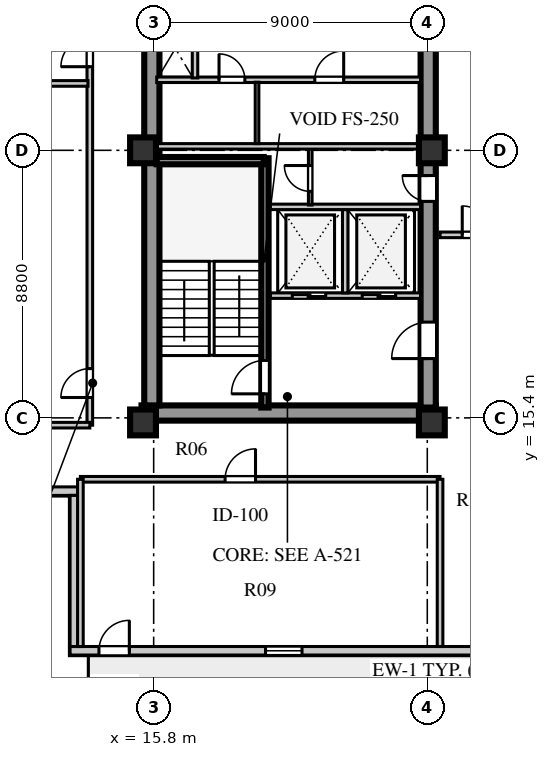
"""IFC4 building model, lengths in metres.
Left out: names, types, materials, properties, quantities, classifications, styles, units other than length and angle.
Written with IfcOpenShell. Run it as: python <this file> out.ifc"""

import sys

from ifc_helpers import new_model, si_unit, direction, frame, frame_2d, origin, origin_2d, place, context, subcontext, project, spatial, rectangle, extrude, element, fill, save


model = new_model("IFC4")
c1 = context("Model", 3, precision=1e-05, world=origin(), true_north=direction((0.0, 1.0)))
c2 = subcontext(c1, "Body", "Model", "MODEL_VIEW")
j1 = project(units=[si_unit("LENGTHUNIT", "METRE"), si_unit("PLANEANGLEUNIT", "RADIAN")], contexts=[c1])
p1 = place(None, origin())
s1 = spatial("IfcSite", under=j1, at=p1, CompositionType="ELEMENT")
p2 = place(p1, origin())
s2 = spatial("IfcBuilding", under=s1, at=p2, CompositionType="ELEMENT")
p3 = place(p2, frame((0.0, 0.0, 157.9)))
s3 = spatial("IfcBuildingStorey", under=s2, at=p3, CompositionType="ELEMENT", Elevation=157.9)
p4 = place(p3, frame((15.4, 15.56, 0.0), z_axis=(0.0, 0.0, 1.0), x_axis=(1.0, 0.0, 0.0)))
e1 = element("IfcWall", 1, at=p4, inside=s3, PredefinedType="SHEAR", context=c2, shape_type="SweptSolid", body=[
    extrude(rectangle(XDim=9.68, YDim=0.5, at=frame_2d((4.84, 0.0))), origin(), (0.0, 0.0, 1.0), 3.6),
])
p5 = place(p3, frame((15.74, 15.81, 0.0), z_axis=(0.0, 0.0, 1.0), x_axis=(0.0, 1.0, 0.0)))
e2 = element("IfcWall", 2, at=p5, inside=s3, PredefinedType="SHEAR", context=c2, shape_type="SweptSolid", body=[
    extrude(rectangle(XDim=25.63, YDim=0.5, at=frame_2d((12.815, 0.0))), origin(), (0.0, 0.0, 1.0), 3.6),
])
p6 = place(p3, frame((24.83, 15.74, 0.0), z_axis=(0.0, 0.0, 1.0), x_axis=(0.0, 1.0, 0.0)))
e3 = element("IfcWall", 3, at=p6, inside=s3, PredefinedType="SHEAR", context=c2, shape_type="SweptSolid", body=[
    extrude(rectangle(XDim=25.76, YDim=0.5, at=frame_2d((12.88, 0.0))), origin(), (0.0, 0.0, 1.0), 3.6),
])
p7 = place(p6, frame((1.61, 0.0, 0.0)))
e4 = element("IfcOpeningElement", 4, at=p7, cuts=e3, PredefinedType="OPENING", context=c2, shape_type="SweptSolid", body=[
    extrude(rectangle(XDim=1.2, YDim=2.1, at=frame_2d((0.6, 1.05))), frame((0.0, 0.26, 0.0), z_axis=(0.0, -1.0, 0.0), x_axis=(1.0, 0.0, 0.0)), (0.0, 0.0, 1.0), 0.52),
])
p8 = place(p6, frame((6.78, 0.0, 0.0)))
e5 = element("IfcOpeningElement", 5, at=p8, cuts=e3, PredefinedType="OPENING", context=c2, shape_type="SweptSolid", body=[
    extrude(rectangle(XDim=0.85, YDim=2.06, at=frame_2d((0.425, 1.03))), frame((0.0, 0.26, 0.0), z_axis=(0.0, -1.0, 0.0), x_axis=(1.0, 0.0, 0.0)), (0.0, 0.0, 1.0), 0.52),
])
p9 = place(p6, frame((12.11, 0.0, 0.0)))
e6 = element("IfcOpeningElement", 6, at=p9, cuts=e3, PredefinedType="OPENING", context=c2, shape_type="SweptSolid", body=[
    extrude(rectangle(XDim=1.5, YDim=2.12, at=frame_2d((0.75, 1.06))), frame((0.0, 0.26, 0.0), z_axis=(0.0, -1.0, 0.0), x_axis=(1.0, 0.0, 0.0)), (0.0, 0.0, 1.0), 0.52),
])
p10 = place(p6, frame((20.11, 0.0, 0.0)))
e7 = element("IfcOpeningElement", 7, at=p10, cuts=e3, PredefinedType="OPENING", context=c2, shape_type="SweptSolid", body=[
    extrude(rectangle(XDim=1.2, YDim=2.12, at=frame_2d((0.6, 1.06))), frame((0.0, 0.26, 0.0), z_axis=(0.0, -1.0, 0.0), x_axis=(1.0, 0.0, 0.0)), (0.0, 0.0, 1.0), 0.52),
])
p11 = place(p6, frame((24.01, 0.0, 0.0)))
e8 = element("IfcOpeningElement", 8, at=p11, cuts=e3, PredefinedType="OPENING", context=c2, shape_type="SweptSolid", body=[
    extrude(rectangle(XDim=0.95, YDim=2.1, at=frame_2d((0.475, 1.05))), frame((0.0, 0.26, 0.0), z_axis=(0.0, -1.0, 0.0), x_axis=(1.0, 0.0, 0.0)), (0.0, 0.0, 1.0), 0.52),
])
for number, where, z_axis, x_axis in (
    (9, (15.45, 15.25, 0.0), (0.0, 0.0, 1.0), (1.0, 0.0, 0.0)),
    (10, (15.45, 24.2, 0.0), (0.0, 0.0, 1.0), (1.0, 0.0, 0.0)),
    (11, (24.95, 15.25, 0.0), (0.0, 0.0, 1.0), (1.0, 0.0, 0.0)),
    (12, (24.95, 24.2, 0.0), (0.0, 0.0, 1.0), (1.0, 0.0, 0.0)),
):
    element("IfcColumn", number, at=place(p3, frame(where, z_axis=z_axis, x_axis=x_axis)), inside=s3, PredefinedType="COLUMN", context=c2, shape_type="SweptSolid", body=[
        extrude(rectangle(XDim=0.85, YDim=0.85, at=origin_2d()), origin(), (0.0, 0.0, 1.0), 3.6),
    ])
p12 = place(p3, frame((13.05, 7.74, 0.0), z_axis=(0.0, 0.0, 1.0), x_axis=(1.0, 0.0, 0.0)))
e13 = element("IfcWall", 13, at=p12, inside=s3, PredefinedType="STANDARD", context=c2, shape_type="SweptSolid", body=[
    extrude(rectangle(XDim=32.5, YDim=0.28, at=frame_2d((16.25, 0.0))), origin(), (0.0, 0.0, 1.0), 3.6),
])
p13 = place(p12, frame((0.95, 0.0, 0.0)))
e14 = element("IfcOpeningElement", 14, at=p13, cuts=e13, PredefinedType="OPENING", context=c2, shape_type="SweptSolid", body=[
    extrude(rectangle(XDim=1.0, YDim=2.05, at=frame_2d((0.5, 1.025))), frame((0.0, 0.15, 0.0), z_axis=(0.0, -1.0, 0.0), x_axis=(1.0, 0.0, 0.0)), (0.0, 0.0, 1.0), 0.3),
])
p14 = place(p12, frame((6.43, 0.0, 0.8)))
e15 = element("IfcOpeningElement", 15, at=p14, cuts=e13, PredefinedType="OPENING", context=c2, shape_type="SweptSolid", body=[
    extrude(rectangle(XDim=1.2, YDim=1.75, at=frame_2d((0.6, 0.875))), frame((0.0, 0.15, 0.0), z_axis=(0.0, -1.0, 0.0), x_axis=(1.0, 0.0, 0.0)), (0.0, 0.0, 1.0), 0.3),
])
p15 = place(p12, frame((17.665, 0.0, 0.8)))
e16 = element("IfcOpeningElement", 16, at=p15, cuts=e13, PredefinedType="OPENING", context=c2, shape_type="SweptSolid", body=[
    extrude(rectangle(XDim=2.4, YDim=2.05, at=frame_2d((1.2, 1.025))), frame((0.0, 0.15, 0.0), z_axis=(0.0, -1.0, 0.0), x_axis=(1.0, 0.0, 0.0)), (0.0, 0.0, 1.0), 0.3),
])
p16 = place(p12, frame((26.065, 0.0, 0.8)))
e17 = element("IfcOpeningElement", 17, at=p16, cuts=e13, PredefinedType="OPENING", context=c2, shape_type="SweptSolid", body=[
    extrude(rectangle(XDim=1.2, YDim=1.75, at=frame_2d((0.6, 0.875))), frame((0.0, 0.15, 0.0), z_axis=(0.0, -1.0, 0.0), x_axis=(1.0, 0.0, 0.0)), (0.0, 0.0, 1.0), 0.3),
])
p17 = place(p12, frame((29.405, 0.0, 0.8)))
e18 = element("IfcOpeningElement", 18, at=p17, cuts=e13, PredefinedType="OPENING", context=c2, shape_type="SweptSolid", body=[
    extrude(rectangle(XDim=1.35, YDim=1.9, at=frame_2d((0.675, 0.95))), frame((0.0, 0.15, 0.0), z_axis=(0.0, -1.0, 0.0), x_axis=(1.0, 0.0, 0.0)), (0.0, 0.0, 1.0), 0.3),
])
p18 = place(p3, frame((7.8, 12.99, 0.0), z_axis=(0.0, 0.0, 1.0), x_axis=(1.0, 0.0, 0.0)))
e19 = element("IfcWall", 19, at=p18, inside=s3, PredefinedType="STANDARD", context=c2, shape_type="SweptSolid", body=[
    extrude(rectangle(XDim=5.53, YDim=0.28, at=frame_2d((2.765, 0.0))), origin(), (0.0, 0.0, 1.0), 3.6),
])
p19 = place(p3, frame((13.19, 12.85, 0.0), z_axis=(0.0, 0.0, 1.0), x_axis=(0.0, -1.0, 0.0)))
e20 = element("IfcWall", 20, at=p19, inside=s3, PredefinedType="STANDARD", context=c2, shape_type="SweptSolid", body=[
    extrude(rectangle(XDim=4.97, YDim=0.28, at=frame_2d((2.485, 0.0))), origin(), (0.0, 0.0, 1.0), 3.6),
])
p20 = place(p3, frame((19.46, 15.74, 0.0), z_axis=(0.0, 0.0, 1.0), x_axis=(0.0, 1.0, 0.0)))
e21 = element("IfcWall", 21, at=p20, inside=s3, PredefinedType="SHEAR", context=c2, shape_type="SweptSolid", body=[
    extrude(rectangle(XDim=8.2, YDim=0.24, at=frame_2d((4.1, 0.0))), origin(), (0.0, 0.0, 1.0), 3.85),
])
p21 = place(p20, frame((0.45, 0.0, 0.0)))
e22 = element("IfcOpeningElement", 22, at=p21, cuts=e21, PredefinedType="OPENING", context=c2, shape_type="SweptSolid", body=[
    extrude(rectangle(XDim=1.1, YDim=2.1, at=frame_2d((0.55, 1.05))), frame((0.0, 0.13, 0.0), z_axis=(0.0, -1.0, 0.0), x_axis=(1.0, 0.0, 0.0)), (0.0, 0.0, 1.0), 0.26),
])
p22 = place(p3, frame((15.9, 23.86, 0.0), z_axis=(0.0, 0.0, 1.0), x_axis=(1.0, 0.0, 0.0)))
e23 = element("IfcWall", 23, at=p22, inside=s3, PredefinedType="SHEAR", context=c2, shape_type="SweptSolid", body=[
    extrude(rectangle(XDim=3.52, YDim=0.24, at=frame_2d((1.76, 0.0))), origin(), (0.0, 0.0, 1.0), 3.85),
])
p23 = place(p3, frame((19.64, 19.42, 0.0), z_axis=(0.0, 0.0, 1.0), x_axis=(1.0, 0.0, 0.0)))
e24 = element("IfcWall", 24, at=p23, inside=s3, PredefinedType="SOLIDWALL", context=c2, shape_type="SweptSolid", body=[
    extrude(rectangle(XDim=4.94, YDim=0.18, at=frame_2d((2.47, 0.0))), origin(), (0.0, 0.0, 1.0), 3.6),
])
p24 = place(p23, frame((0.72, 0.0, 0.0)))
e25 = element("IfcOpeningElement", 25, at=p24, cuts=e24, PredefinedType="OPENING", context=c2, shape_type="SweptSolid", body=[
    extrude(rectangle(XDim=1.1, YDim=2.1, at=frame_2d((0.55, 1.05))), frame((0.0, 0.1, 0.0), z_axis=(0.0, -1.0, 0.0), x_axis=(1.0, 0.0, 0.0)), (0.0, 0.0, 1.0), 0.2),
])
p25 = place(p23, frame((3.02, 0.0, 0.0)))
e26 = element("IfcOpeningElement", 26, at=p25, cuts=e24, PredefinedType="OPENING", context=c2, shape_type="SweptSolid", body=[
    extrude(rectangle(XDim=1.1, YDim=2.1, at=frame_2d((0.55, 1.05))), frame((0.0, 0.1, 0.0), z_axis=(0.0, -1.0, 0.0), x_axis=(1.0, 0.0, 0.0)), (0.0, 0.0, 1.0), 0.2),
])
p26 = place(p3, frame((22.1, 19.51, 0.0), z_axis=(0.0, 0.0, 1.0), x_axis=(0.0, 1.0, 0.0)))
e27 = element("IfcWall", 27, at=p26, inside=s3, PredefinedType="SOLIDWALL", context=c2, shape_type="SweptSolid", body=[
    extrude(rectangle(XDim=2.74, YDim=0.18, at=frame_2d((1.37, 0.0))), origin(), (0.0, 0.0, 1.0), 3.6),
])
p27 = place(p3, frame((19.64, 22.34, 0.0), z_axis=(0.0, 0.0, 1.0), x_axis=(1.0, 0.0, 0.0)))
e28 = element("IfcWall", 28, at=p27, inside=s3, PredefinedType="SOLIDWALL", context=c2, shape_type="SweptSolid", body=[
    extrude(rectangle(XDim=4.94, YDim=0.18, at=frame_2d((2.47, 0.0))), origin(), (0.0, 0.0, 1.0), 3.6),
])
p28 = place(p3, frame((20.95, 22.4, 0.0), z_axis=(0.0, 0.0, 1.0), x_axis=(0.0, 1.0, 0.0)))
e29 = element("IfcWall", 29, at=p28, inside=s3, PredefinedType="PARTITIONING", context=c2, shape_type="SweptSolid", body=[
    extrude(rectangle(XDim=1.88, YDim=0.12, at=frame_2d((0.94, 0.0))), origin(), (0.0, 0.0, 1.0), 3.6),
])
p29 = place(p28, frame((0.45, 0.0, 0.0)))
e30 = element("IfcOpeningElement", 30, at=p29, cuts=e29, PredefinedType="OPENING", context=c2, shape_type="SweptSolid", body=[
    extrude(rectangle(XDim=0.85, YDim=2.06, at=frame_2d((0.425, 1.03))), frame((0.0, 0.07, 0.0), z_axis=(0.0, -1.0, 0.0), x_axis=(1.0, 0.0, 0.0)), (0.0, 0.0, 1.0), 0.14),
])
p30 = place(p3, frame((15.9, 26.52, 0.0), z_axis=(0.0, 0.0, 1.0), x_axis=(1.0, 0.0, 0.0)))
e31 = element("IfcWall", 31, at=p30, inside=s3, PredefinedType="SOLIDWALL", context=c2, shape_type="SweptSolid", body=[
    extrude(rectangle(XDim=8.68, YDim=0.18, at=frame_2d((4.34, 0.0))), origin(), (0.0, 0.0, 1.0), 3.6),
])
p31 = place(p30, frame((2.05, 0.0, 0.0)))
e32 = element("IfcOpeningElement", 32, at=p31, cuts=e31, PredefinedType="OPENING", context=c2, shape_type="SweptSolid", body=[
    extrude(rectangle(XDim=0.85, YDim=2.06, at=frame_2d((0.425, 1.03))), frame((0.0, 0.1, 0.0), z_axis=(0.0, -1.0, 0.0), x_axis=(1.0, 0.0, 0.0)), (0.0, 0.0, 1.0), 0.2),
])
p32 = place(p30, frame((5.2, 0.0, 0.0)))
e33 = element("IfcOpeningElement", 33, at=p32, cuts=e31, PredefinedType="OPENING", context=c2, shape_type="SweptSolid", body=[
    extrude(rectangle(XDim=0.95, YDim=2.1, at=frame_2d((0.475, 1.05))), frame((0.0, 0.1, 0.0), z_axis=(0.0, -1.0, 0.0), x_axis=(1.0, 0.0, 0.0)), (0.0, 0.0, 1.0), 0.2),
])
p33 = place(p3, frame((15.9, 24.33, 0.0), z_axis=(0.0, 0.0, 1.0), x_axis=(1.0, 0.0, 0.0)))
e34 = element("IfcWall", 34, at=p33, inside=s3, PredefinedType="SOLIDWALL", context=c2, shape_type="SweptSolid", body=[
    extrude(rectangle(XDim=8.68, YDim=0.18, at=frame_2d((4.34, 0.0))), origin(), (0.0, 0.0, 1.0), 2.95),
])
p34 = place(p3, frame((19.2, 24.42, 0.0), z_axis=(0.0, 0.0, 1.0), x_axis=(0.0, 1.0, 0.0)))
e35 = element("IfcWall", 35, at=p34, inside=s3, PredefinedType="PARTITIONING", context=c2, shape_type="SweptSolid", body=[
    extrude(rectangle(XDim=2.02, YDim=0.12, at=frame_2d((1.01, 0.0))), origin(), (0.0, 0.0, 1.0), 3.6),
])
p35 = place(p3, frame((17.16, 26.58, 0.0), z_axis=(0.0, 0.0, 1.0), x_axis=(0.0, 1.0, 0.0)))
e36 = element("IfcWall", 36, at=p35, inside=s3, PredefinedType="SOLIDWALL", context=c2, shape_type="SweptSolid", body=[
    extrude(rectangle(XDim=4.02, YDim=0.18, at=frame_2d((2.01, 0.0))), origin(), (0.0, 0.0, 1.0), 3.6),
])
p36 = place(p35, frame((2.35, 0.0, 0.0)))
e37 = element("IfcOpeningElement", 37, at=p36, cuts=e36, PredefinedType="OPENING", context=c2, shape_type="SweptSolid", body=[
    extrude(rectangle(XDim=0.85, YDim=2.06, at=frame_2d((0.425, 1.03))), frame((0.0, 0.1, 0.0), z_axis=(0.0, -1.0, 0.0), x_axis=(1.0, 0.0, 0.0)), (0.0, 0.0, 1.0), 0.2),
])
p37 = place(p3, frame((25.22, 21.42, 0.0), z_axis=(0.0, 0.0, 1.0), x_axis=(1.0, 0.0, 0.0)))
e38 = element("IfcWall", 38, at=p37, inside=s3, PredefinedType="SOLIDWALL", context=c2, shape_type="SweptSolid", body=[
    extrude(rectangle(XDim=15.6, YDim=0.185, at=frame_2d((7.8, 0.0))), origin(), (0.0, 0.0, 1.0), 3.25),
])
p38 = place(p37, frame((0.73, 0.0, 0.0)))
e39 = element("IfcOpeningElement", 39, at=p38, cuts=e38, PredefinedType="OPENING", context=c2, shape_type="SweptSolid", body=[
    extrude(rectangle(XDim=0.95, YDim=2.1, at=frame_2d((0.475, 1.05))), frame((0.0, 0.103, 0.0), z_axis=(0.0, -1.0, 0.0), x_axis=(1.0, 0.0, 0.0)), (0.0, 0.0, 1.0), 0.205),
])
p39 = place(p3, frame((13.7, 15.16, 0.0), z_axis=(0.0, 0.0, 1.0), x_axis=(0.0, 1.0, 0.0)))
e40 = element("IfcWall", 40, at=p39, inside=s3, PredefinedType="SOLIDWALL", context=c2, shape_type="SweptSolid", body=[
    extrude(rectangle(XDim=26.88, YDim=0.185, at=frame_2d((13.44, 0.0))), origin(), (0.0, 0.0, 1.0), 3.6),
])
p40 = place(p39, frame((0.91, 0.0, 0.0)))
e41 = element("IfcOpeningElement", 41, at=p40, cuts=e40, PredefinedType="OPENING", context=c2, shape_type="SweptSolid", body=[
    extrude(rectangle(XDim=0.95, YDim=2.1, at=frame_2d((0.475, 1.05))), frame((0.0, 0.103, 0.0), z_axis=(0.0, -1.0, 0.0), x_axis=(1.0, 0.0, 0.0)), (0.0, 0.0, 1.0), 0.205),
])
p41 = place(p39, frame((11.79, 0.0, 0.0)))
e42 = element("IfcOpeningElement", 42, at=p41, cuts=e40, PredefinedType="OPENING", context=c2, shape_type="SweptSolid", body=[
    extrude(rectangle(XDim=0.95, YDim=2.1, at=frame_2d((0.475, 1.05))), frame((0.0, 0.103, 0.0), z_axis=(0.0, -1.0, 0.0), x_axis=(1.0, 0.0, 0.0)), (0.0, 0.0, 1.0), 0.205),
])
p42 = place(p3, frame((8.08, 15.16, 0.0), z_axis=(0.0, 0.0, 1.0), x_axis=(1.0, 0.0, 0.0)))
e43 = element("IfcWall", 43, at=p42, inside=s3, PredefinedType="SOLIDWALL", context=c2, shape_type="SweptSolid", body=[
    extrude(rectangle(XDim=5.62, YDim=0.185, at=frame_2d((2.81, 0.0))), origin(), (0.0, 0.0, 1.0), 3.15),
])
p43 = place(p3, frame((13.39, 13.38, 0.0), z_axis=(0.0, 0.0, 1.0), x_axis=(1.0, 0.0, 0.0)))
e44 = element("IfcWall", 44, at=p43, inside=s3, PredefinedType="SOLIDWALL", context=c2, shape_type="SweptSolid", body=[
    extrude(rectangle(XDim=11.83, YDim=0.185, at=frame_2d((5.915, 0.0))), origin(), (0.0, 0.0, 1.0), 3.6),
])
p44 = place(p43, frame((4.76, 0.0, 0.0)))
e45 = element("IfcOpeningElement", 45, at=p44, cuts=e44, PredefinedType="OPENING", context=c2, shape_type="SweptSolid", body=[
    extrude(rectangle(XDim=1.0, YDim=2.08, at=frame_2d((0.5, 1.04))), frame((0.0, 0.103, 0.0), z_axis=(0.0, -1.0, 0.0), x_axis=(1.0, 0.0, 0.0)), (0.0, 0.0, 1.0), 0.205),
])
p45 = place(p3, frame((13.39, 7.88, 0.0), z_axis=(0.0, 0.0, 1.0), x_axis=(0.0, 1.0, 0.0)))
e46 = element("IfcWall", 46, at=p45, inside=s3, PredefinedType="SOLIDWALL", context=c2, shape_type="SweptSolid", body=[
    extrude(rectangle(XDim=5.5, YDim=0.185, at=frame_2d((2.75, 0.0))), origin(), (0.0, 0.0, 1.0), 3.6),
])
p46 = place(p3, frame((25.22, 7.88, 0.0), z_axis=(0.0, 0.0, 1.0), x_axis=(0.0, 1.0, 0.0)))
e47 = element("IfcWall", 47, at=p46, inside=s3, PredefinedType="SOLIDWALL", context=c2, shape_type="SweptSolid", body=[
    extrude(rectangle(XDim=5.5, YDim=0.185, at=frame_2d((2.75, 0.0))), origin(), (0.0, 0.0, 1.0), 3.15),
])
p47 = place(p3, frame((8.08, 26.4, 0.0), z_axis=(0.0, 0.0, 1.0), x_axis=(1.0, 0.0, 0.0)))
e48 = element("IfcWall", 48, at=p47, inside=s3, PredefinedType="SOLIDWALL", context=c2, shape_type="SweptSolid", body=[
    extrude(rectangle(XDim=5.56, YDim=0.185, at=frame_2d((2.78, 0.0))), origin(), (0.0, 0.0, 1.0), 3.6),
])
p48 = place(p13, frame((1.0, 0.0, 0.0), z_axis=(0.0, 0.0, 1.0), x_axis=(-1.0, 0.0, 0.0)))
e49 = element("IfcDoor", 49, at=p48, inside=s3, OperationType="SINGLE_SWING_LEFT", PredefinedType="DOOR", context=c2, shape_type="SweptSolid", body=[
    extrude(rectangle(XDim=1.0, YDim=2.05, at=frame_2d((0.5, 1.025))), frame((0.0, 0.025, 0.0), z_axis=(0.0, -1.0, 0.0), x_axis=(1.0, 0.0, 0.0)), (0.0, 0.0, 1.0), 0.05),
])
fill(e14, e49)
p49 = place(p14, origin())
e50 = element("IfcWindow", 50, at=p49, inside=s3, PartitioningType="SINGLE_PANEL", PredefinedType="WINDOW", context=c2, shape_type="SweptSolid", body=[
    extrude(rectangle(XDim=1.2, YDim=1.75, at=frame_2d((0.6, 0.875))), frame((0.0, 0.03, 0.0), z_axis=(0.0, -1.0, 0.0), x_axis=(1.0, 0.0, 0.0)), (0.0, 0.0, 1.0), 0.06),
])
fill(e15, e50)
p50 = place(p21, origin())
e51 = element("IfcDoor", 51, at=p50, inside=s3, OperationType="SINGLE_SWING_LEFT", PredefinedType="DOOR", context=c2, shape_type="SweptSolid", body=[
    extrude(rectangle(XDim=1.1, YDim=2.1, at=frame_2d((0.55, 1.05))), frame((0.0, 0.025, 0.0), z_axis=(0.0, -1.0, 0.0), x_axis=(1.0, 0.0, 0.0)), (0.0, 0.0, 1.0), 0.05),
])
fill(e22, e51)
p51 = place(p24, origin())
e52 = element("IfcDoor", 52, at=p51, inside=s3, OperationType="DOUBLE_DOOR_SLIDING", PredefinedType="DOOR", context=c2, shape_type="SweptSolid", body=[
    extrude(rectangle(XDim=1.1, YDim=2.1, at=frame_2d((0.55, 1.05))), frame((0.0, 0.025, 0.0), z_axis=(0.0, -1.0, 0.0), x_axis=(1.0, 0.0, 0.0)), (0.0, 0.0, 1.0), 0.05),
])
fill(e25, e52)
p52 = place(p25, origin())
e53 = element("IfcDoor", 53, at=p52, inside=s3, OperationType="DOUBLE_DOOR_SLIDING", PredefinedType="DOOR", context=c2, shape_type="SweptSolid", body=[
    extrude(rectangle(XDim=1.1, YDim=2.1, at=frame_2d((0.55, 1.05))), frame((0.0, 0.025, 0.0), z_axis=(0.0, -1.0, 0.0), x_axis=(1.0, 0.0, 0.0)), (0.0, 0.0, 1.0), 0.05),
])
fill(e26, e53)
p53 = place(p7, frame((1.2, 0.0, 0.0), z_axis=(0.0, 0.0, 1.0), x_axis=(-1.0, 0.0, 0.0)))
e54 = element("IfcDoor", 54, at=p53, inside=s3, OperationType="SINGLE_SWING_RIGHT", PredefinedType="DOOR", context=c2, shape_type="SweptSolid", body=[
    extrude(rectangle(XDim=1.2, YDim=2.1, at=frame_2d((0.6, 1.05))), frame((0.0, 0.025, 0.0), z_axis=(0.0, -1.0, 0.0), x_axis=(1.0, 0.0, 0.0)), (0.0, 0.0, 1.0), 0.05),
])
fill(e4, e54)
p54 = place(p29, origin())
e55 = element("IfcDoor", 55, at=p54, inside=s3, OperationType="SINGLE_SWING_RIGHT", PredefinedType="DOOR", context=c2, shape_type="SweptSolid", body=[
    extrude(rectangle(XDim=0.85, YDim=2.06, at=frame_2d((0.425, 1.03))), frame((0.0, 0.025, 0.0), z_axis=(0.0, -1.0, 0.0), x_axis=(1.0, 0.0, 0.0)), (0.0, 0.0, 1.0), 0.05),
])
fill(e30, e55)
p55 = place(p8, frame((0.85, 0.0, 0.0), z_axis=(0.0, 0.0, 1.0), x_axis=(-1.0, 0.0, 0.0)))
e56 = element("IfcDoor", 56, at=p55, inside=s3, OperationType="SINGLE_SWING_LEFT", PredefinedType="DOOR", context=c2, shape_type="SweptSolid", body=[
    extrude(rectangle(XDim=0.85, YDim=2.06, at=frame_2d((0.425, 1.03))), frame((0.0, 0.025, 0.0), z_axis=(0.0, -1.0, 0.0), x_axis=(1.0, 0.0, 0.0)), (0.0, 0.0, 1.0), 0.05),
])
fill(e5, e56)
p56 = place(p31, origin())
e57 = element("IfcDoor", 57, at=p56, inside=s3, OperationType="SINGLE_SWING_LEFT", PredefinedType="DOOR", context=c2, shape_type="SweptSolid", body=[
    extrude(rectangle(XDim=0.85, YDim=2.06, at=frame_2d((0.425, 1.03))), frame((0.0, 0.025, 0.0), z_axis=(0.0, -1.0, 0.0), x_axis=(1.0, 0.0, 0.0)), (0.0, 0.0, 1.0), 0.05),
])
fill(e32, e57)
p57 = place(p32, origin())
e58 = element("IfcDoor", 58, at=p57, inside=s3, OperationType="SINGLE_SWING_RIGHT", PredefinedType="DOOR", context=c2, shape_type="SweptSolid", body=[
    extrude(rectangle(XDim=0.95, YDim=2.1, at=frame_2d((0.475, 1.05))), frame((0.0, 0.025, 0.0), z_axis=(0.0, -1.0, 0.0), x_axis=(1.0, 0.0, 0.0)), (0.0, 0.0, 1.0), 0.05),
])
fill(e33, e58)
p58 = place(p44, frame((1.0, 0.0, 0.0), z_axis=(0.0, 0.0, 1.0), x_axis=(-1.0, 0.0, 0.0)))
e59 = element("IfcDoor", 59, at=p58, inside=s3, OperationType="SINGLE_SWING_LEFT", PredefinedType="DOOR", context=c2, shape_type="SweptSolid", body=[
    extrude(rectangle(XDim=1.0, YDim=2.08, at=frame_2d((0.5, 1.04))), frame((0.0, 0.025, 0.0), z_axis=(0.0, -1.0, 0.0), x_axis=(1.0, 0.0, 0.0)), (0.0, 0.0, 1.0), 0.05),
])
fill(e45, e59)
p59 = place(p40, origin())
e60 = element("IfcDoor", 60, at=p59, inside=s3, OperationType="SINGLE_SWING_LEFT", PredefinedType="DOOR", context=c2, shape_type="SweptSolid", body=[
    extrude(rectangle(XDim=0.95, YDim=2.1, at=frame_2d((0.475, 1.05))), frame((0.0, 0.025, 0.0), z_axis=(0.0, -1.0, 0.0), x_axis=(1.0, 0.0, 0.0)), (0.0, 0.0, 1.0), 0.05),
])
fill(e41, e60)
p60 = place(p41, origin())
e61 = element("IfcDoor", 61, at=p60, inside=s3, OperationType="SINGLE_SWING_LEFT", PredefinedType="DOOR", context=c2, shape_type="SweptSolid", body=[
    extrude(rectangle(XDim=0.95, YDim=2.1, at=frame_2d((0.475, 1.05))), frame((0.0, 0.025, 0.0), z_axis=(0.0, -1.0, 0.0), x_axis=(1.0, 0.0, 0.0)), (0.0, 0.0, 1.0), 0.05),
])
fill(e42, e61)
p61 = place(p38, frame((0.95, 0.0, 0.0), z_axis=(0.0, 0.0, 1.0), x_axis=(-1.0, 0.0, 0.0)))
e62 = element("IfcDoor", 62, at=p61, inside=s3, OperationType="SINGLE_SWING_RIGHT", PredefinedType="DOOR", context=c2, shape_type="SweptSolid", body=[
    extrude(rectangle(XDim=0.95, YDim=2.1, at=frame_2d((0.475, 1.05))), frame((0.0, 0.025, 0.0), z_axis=(0.0, -1.0, 0.0), x_axis=(1.0, 0.0, 0.0)), (0.0, 0.0, 1.0), 0.05),
])
fill(e39, e62)
save(model, sys.argv[1])
